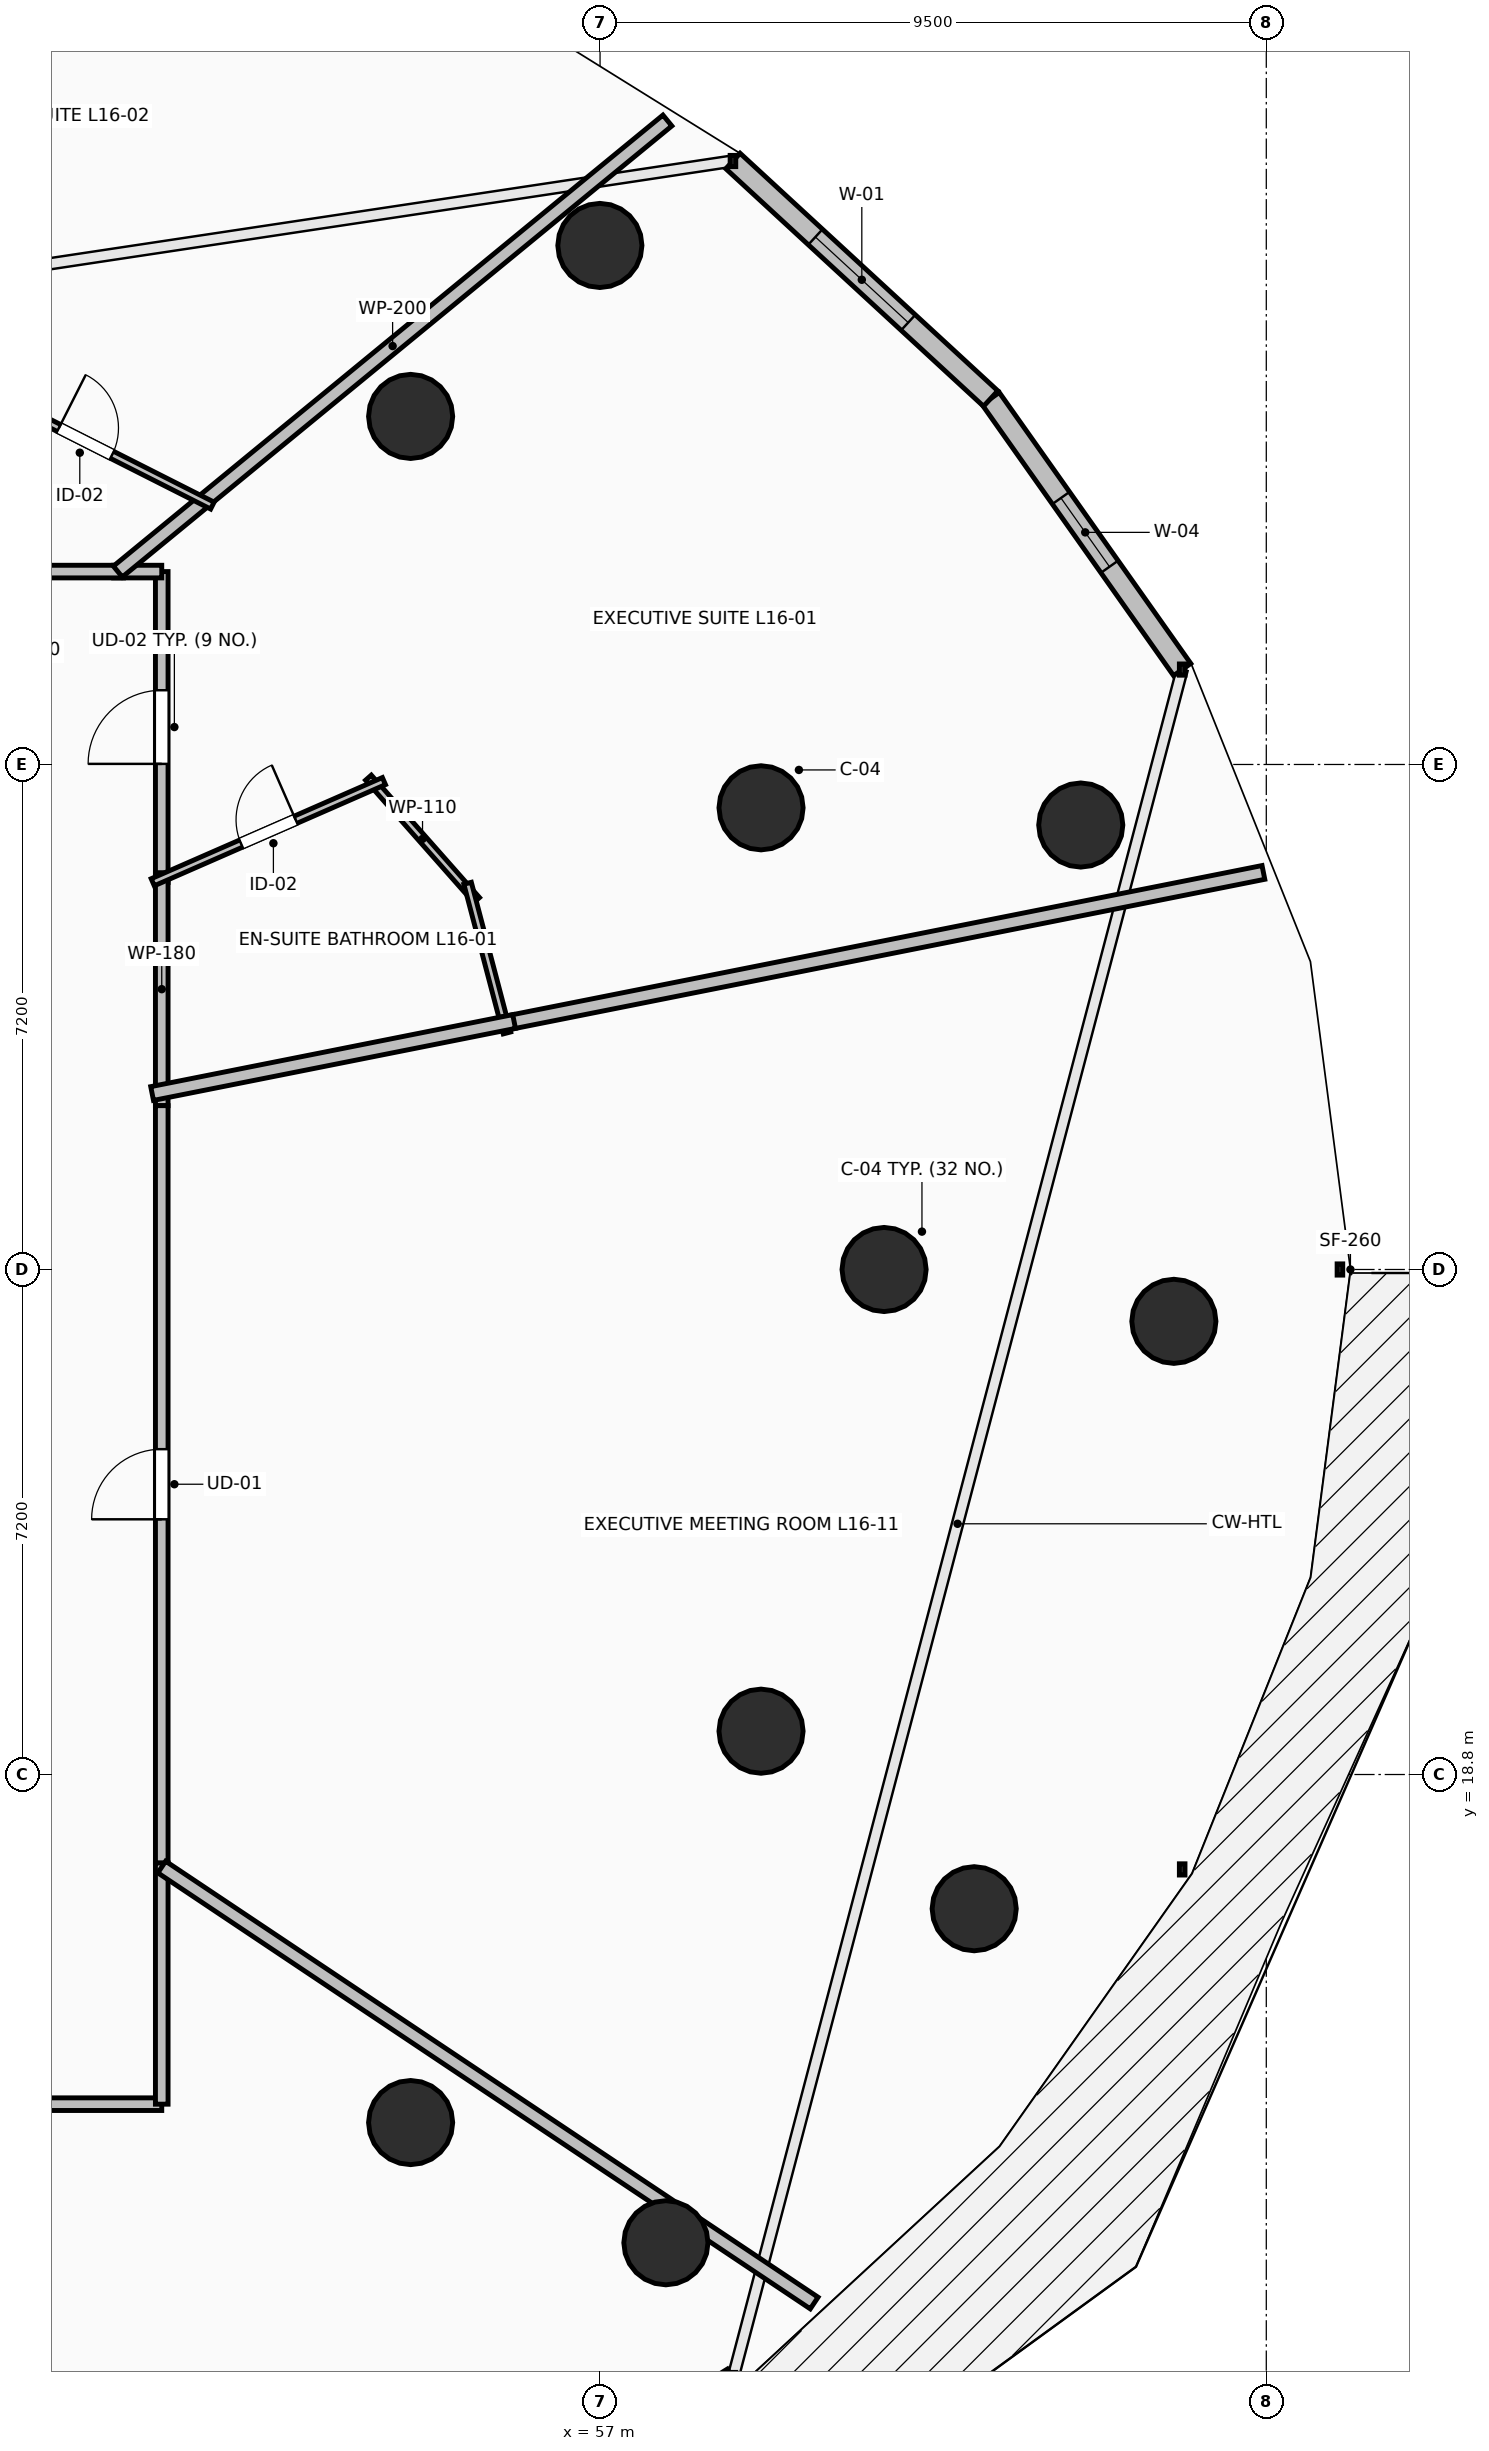
"""IFC4 building model, lengths in metres.
Left out: names, types, materials, properties, quantities, classifications, styles, units other than length and angle.
Written with IfcOpenShell. Run it as: python <this file> out.ifc"""

import sys

from ifc_helpers import new_model, si_unit, direction, frame, frame_2d, origin, origin_2d, place, context, subcontext, project, spatial, rectangle, circle, extrude, element, fill, save


model = new_model("IFC4")
c1 = context("Model", 3, precision=1e-05, world=origin(), true_north=direction((0.0, 1.0)))
c2 = subcontext(c1, "Body", "Model", "MODEL_VIEW")
j1 = project(units=[si_unit("LENGTHUNIT", "METRE"), si_unit("PLANEANGLEUNIT", "RADIAN")], contexts=[c1])
p1 = place(None, origin())
s1 = spatial("IfcSite", under=j1, at=p1, CompositionType="ELEMENT")
p2 = place(p1, origin())
s2 = spatial("IfcBuilding", under=s1, at=p2, CompositionType="ELEMENT")
p3 = place(p2, frame((0.0, 0.0, 62.5)))
s3 = spatial("IfcBuildingStorey", under=s2, at=p3, CompositionType="ELEMENT", Elevation=62.5)
for number, where, z_axis, x_axis in (
    (1, (61.05, 26.0, 0.0), (0.0, 0.0, 1.0), (1.0, 0.0, 0.0)),
    (2, (59.295, 32.582, 0.0), (0.0, 0.0, 1.0), (0.924, 0.383, 0.0)),
    (3, (54.299, 38.162, 0.0), (0.0, 0.0, 1.0), (0.707, 0.707, 0.0)),
    (4, (54.299, 13.838, 0.0), (0.0, 0.0, 1.0), (0.707, -0.707, 0.0)),
    (5, (59.295, 19.418, 0.0), (0.0, 0.0, 1.0), (0.924, -0.383, 0.0)),
    (6, (65.182, 25.261, 0.0), (0.0, 0.0, 1.0), (1.0, 0.0, 0.0)),
    (7, (63.854, 32.337, 0.0), (0.0, 0.0, 1.0), (0.924, 0.383, 0.0)),
    (8, (56.997, 40.6, 0.0), (0.0, 0.0, 1.0), (0.707, 0.707, 0.0)),
    (9, (57.939, 12.124, 0.0), (0.0, 0.0, 1.0), (0.707, -0.707, 0.0)),
    (10, (62.335, 16.886, 0.0), (0.0, 0.0, 1.0), (0.924, -0.383, 0.0)),
):
    element("IfcColumn", number, at=place(p3, frame(where, z_axis=z_axis, x_axis=x_axis)), inside=s3, PredefinedType="COLUMN", context=c2, shape_type="SweptSolid", body=[
        extrude(circle(Radius=0.6, at=origin_2d()), origin(), (0.0, 0.0, 1.0), 3.5),
    ])
p4 = place(p3, frame((65.301, 34.553, 0.0), z_axis=(0.0, 0.0, 1.0), x_axis=(-0.577130815624, 0.816651713803, 0.0)))
e11 = element("IfcWall", 11, at=p4, inside=s3, PredefinedType="STANDARD", context=c2, shape_type="SweptSolid", body=[
    extrude(rectangle(XDim=4.731, YDim=0.3, at=frame_2d((2.366, 0.0))), origin(), (0.0, 0.0, 1.0), 3.24),
])
p5 = place(p4, frame((1.795, 0.0, 0.85)))
e12 = element("IfcOpeningElement", 12, at=p5, cuts=e11, PredefinedType="OPENING", context=c2, shape_type="SweptSolid", body=[
    extrude(rectangle(XDim=1.2, YDim=1.95, at=frame_2d((0.6, 0.975))), frame((0.0, 0.165, 0.0), z_axis=(0.0, -1.0, 0.0), x_axis=(1.0, 0.0, 0.0)), (0.0, 0.0, 1.0), 0.33),
])
p6 = place(p3, frame((62.57, 38.417, 0.0), z_axis=(0.0, 0.0, 1.0), x_axis=(-0.735342629635, 0.677695519419, 0.0)))
e13 = element("IfcWall", 13, at=p6, inside=s3, PredefinedType="STANDARD", context=c2, shape_type="SweptSolid", body=[
    extrude(rectangle(XDim=4.997, YDim=0.3, at=frame_2d((2.499, 0.0))), origin(), (0.0, 0.0, 1.0), 3.24),
])
p7 = place(p6, frame((1.599, 0.0, 0.85)))
e14 = element("IfcOpeningElement", 14, at=p7, cuts=e13, PredefinedType="OPENING", context=c2, shape_type="SweptSolid", body=[
    extrude(rectangle(XDim=1.8, YDim=2.19, at=frame_2d((0.9, 1.095))), frame((0.0, 0.165, 0.0), z_axis=(0.0, -1.0, 0.0), x_axis=(1.0, 0.0, 0.0)), (0.0, 0.0, 1.0), 0.33),
])
p8 = place(p3, frame((54.417, 7.417, 0.0), z_axis=(0.0, 0.0, 1.0), x_axis=(0.849633724826, 0.527373239404, 0.0)))
e15 = element("IfcWall", 15, at=p8, inside=s3, PredefinedType="STANDARD", context=c2, shape_type="SweptSolid", body=[
    extrude(rectangle(XDim=5.271, YDim=0.3, at=frame_2d((2.635, 0.0))), origin(), (0.0, 0.0, 1.0), 3.24),
])
p9 = place(p8, frame((1.735, 0.0, 0.85)))
e16 = element("IfcOpeningElement", 16, at=p9, cuts=e15, PredefinedType="OPENING", context=c2, shape_type="SweptSolid", body=[
    extrude(rectangle(XDim=1.8, YDim=2.19, at=frame_2d((0.9, 1.095))), frame((0.0, 0.165, 0.0), z_axis=(0.0, -1.0, 0.0), x_axis=(1.0, 0.0, 0.0)), (0.0, 0.0, 1.0), 0.33),
])
p10 = place(p3, frame((50.75, 31.517, 0.0), z_axis=(0.0, 0.0, 1.0), x_axis=(0.0, 1.0, 0.0)))
e17 = element("IfcWall", 17, at=p10, inside=s3, PredefinedType="PARTITIONING", context=c2, shape_type="SweptSolid", body=[
    extrude(rectangle(XDim=4.433, YDim=0.18, at=frame_2d((2.216, 0.0))), origin(), (0.0, 0.0, 1.0), 2.432),
])
p11 = place(p10, frame((1.691, 0.0, 0.0)))
e18 = element("IfcOpeningElement", 18, at=p11, cuts=e17, PredefinedType="OPENING", context=c2, shape_type="SweptSolid", body=[
    extrude(rectangle(XDim=1.05, YDim=2.2, at=frame_2d((0.525, 1.1))), frame((0.0, 0.105, 0.0), z_axis=(0.0, -1.0, 0.0), x_axis=(1.0, 0.0, 0.0)), (0.0, 0.0, 1.0), 0.21),
])
p12 = place(p3, frame((50.75, 35.95, 0.0), z_axis=(0.0, 0.0, 1.0), x_axis=(-1.0, 0.0, 0.0)))
e19 = element("IfcWall", 19, at=p12, inside=s3, PredefinedType="PARTITIONING", context=c2, shape_type="SweptSolid", body=[
    extrude(rectangle(XDim=0.686, YDim=0.18, at=frame_2d((0.343, 0.0))), origin(), (0.0, 0.0, 1.0), 3.24),
])
p13 = place(p3, frame((50.75, 28.336, 0.0), z_axis=(0.0, 0.0, 1.0), x_axis=(0.0, 1.0, 0.0)))
e20 = element("IfcWall", 20, at=p13, inside=s3, PredefinedType="PARTITIONING", context=c2, shape_type="SweptSolid", body=[
    extrude(rectangle(XDim=3.321, YDim=0.18, at=frame_2d((1.661, 0.0))), origin(), (0.0, 0.0, 1.0), 3.24),
])
p14 = place(p3, frame((50.204, 35.95, 0.0), z_axis=(0.0, 0.0, 1.0), x_axis=(-1.0, 0.0, 0.0)))
e21 = element("IfcWall", 21, at=p14, inside=s3, PredefinedType="PARTITIONING", context=c2, shape_type="SweptSolid", body=[
    extrude(rectangle(XDim=4.424, YDim=0.18, at=frame_2d((2.212, 0.0))), origin(), (0.0, 0.0, 1.0), 2.432),
])
p15 = place(p3, frame((42.34, 14.1, 0.0), z_axis=(0.0, 0.0, 1.0), x_axis=(1.0, 0.0, 0.0)))
e22 = element("IfcWall", 22, at=p15, inside=s3, PredefinedType="PARTITIONING", context=c2, shape_type="SweptSolid", body=[
    extrude(rectangle(XDim=8.41, YDim=0.18, at=frame_2d((4.205, 0.0))), origin(), (0.0, 0.0, 1.0), 2.432),
])
p16 = place(p15, frame((3.705, 0.0, 0.0)))
e23 = element("IfcOpeningElement", 23, at=p16, cuts=e22, PredefinedType="OPENING", context=c2, shape_type="SweptSolid", body=[
    extrude(rectangle(XDim=1.0, YDim=2.15, at=frame_2d((0.5, 1.075))), frame((0.0, 0.105, 0.0), z_axis=(0.0, -1.0, 0.0), x_axis=(1.0, 0.0, 0.0)), (0.0, 0.0, 1.0), 0.21),
])
p17 = place(p3, frame((50.75, 14.1, 0.0), z_axis=(0.0, 0.0, 1.0), x_axis=(0.0, 1.0, 0.0)))
e24 = element("IfcWall", 24, at=p17, inside=s3, PredefinedType="PARTITIONING", context=c2, shape_type="SweptSolid", body=[
    extrude(rectangle(XDim=3.441, YDim=0.18, at=frame_2d((1.72, 0.0))), origin(), (0.0, 0.0, 1.0), 2.432),
])
p18 = place(p3, frame((50.75, 17.541, 0.0), z_axis=(0.0, 0.0, 1.0), x_axis=(0.0, 1.0, 0.0)))
e25 = element("IfcWall", 25, at=p18, inside=s3, PredefinedType="PARTITIONING", context=c2, shape_type="SweptSolid", body=[
    extrude(rectangle(XDim=10.795, YDim=0.18, at=frame_2d((5.397, 0.0))), origin(), (0.0, 0.0, 1.0), 2.432),
])
p19 = place(p18, frame((4.897, 0.0, 0.0)))
e26 = element("IfcOpeningElement", 26, at=p19, cuts=e25, PredefinedType="OPENING", context=c2, shape_type="SweptSolid", body=[
    extrude(rectangle(XDim=1.0, YDim=2.15, at=frame_2d((0.5, 1.075))), frame((0.0, 0.105, 0.0), z_axis=(0.0, -1.0, 0.0), x_axis=(1.0, 0.0, 0.0)), (0.0, 0.0, 1.0), 0.21),
])
p20 = place(p3, frame((53.697, 33.012, 0.0), z_axis=(0.0, 0.0, 1.0), x_axis=(0.66211021146, -0.749406477074, 0.0)))
e27 = element("IfcWall", 27, at=p20, inside=s3, PredefinedType="PARTITIONING", context=c2, shape_type="SweptSolid", body=[
    extrude(rectangle(XDim=2.33, YDim=0.11, at=frame_2d((1.165, 0.0))), origin(), (0.0, 0.0, 1.0), 2.432),
])
p21 = place(p3, frame((55.111, 31.506, 0.0), z_axis=(0.0, 0.0, 1.0), x_axis=(0.254389812051, -0.967101764823, 0.0)))
e28 = element("IfcWall", 28, at=p21, inside=s3, PredefinedType="PARTITIONING", context=c2, shape_type="SweptSolid", body=[
    extrude(rectangle(XDim=2.206, YDim=0.11, at=frame_2d((1.103, 0.0))), origin(), (0.0, 0.0, 1.0), 3.24),
])
p22 = place(p3, frame((50.622, 31.521, 0.0), z_axis=(0.0, 0.0, 1.0), x_axis=(0.91617134915, 0.400786799928, 0.0)))
e29 = element("IfcWall", 29, at=p22, inside=s3, PredefinedType="PARTITIONING", context=c2, shape_type="SweptSolid", body=[
    extrude(rectangle(XDim=3.598, YDim=0.11, at=frame_2d((1.799, 0.0))), origin(), (0.0, 0.0, 1.0), 2.432),
])
p23 = place(p22, frame((1.374, 0.0, 0.0)))
e30 = element("IfcOpeningElement", 30, at=p23, cuts=e29, PredefinedType="OPENING", context=c2, shape_type="SweptSolid", body=[
    extrude(rectangle(XDim=0.85, YDim=2.1, at=frame_2d((0.425, 1.05))), frame((0.0, 0.07, 0.0), z_axis=(0.0, -1.0, 0.0), x_axis=(1.0, 0.0, 0.0)), (0.0, 0.0, 1.0), 0.14),
])
p24 = place(p3, frame((57.96, 42.381, 0.0), z_axis=(0.0, 0.0, 1.0), x_axis=(-0.772992813725, -0.634414777515, 0.0)))
e31 = element("IfcWall", 31, at=p24, inside=s3, PredefinedType="PARTITIONING", context=c2, shape_type="SweptSolid", body=[
    extrude(rectangle(XDim=10.137, YDim=0.2, at=frame_2d((5.069, 0.0))), origin(), (0.0, 0.0, 1.0), 2.624),
])
p25 = place(p3, frame((55.637, 29.508, 0.0), z_axis=(0.0, 0.0, 1.0), x_axis=(0.980781844691, 0.195107593712, 0.0)))
e32 = element("IfcWall", 32, at=p25, inside=s3, PredefinedType="PARTITIONING", context=c2, shape_type="SweptSolid", body=[
    extrude(rectangle(XDim=11.034, YDim=0.2, at=frame_2d((5.517, 0.0))), origin(), (0.0, 0.0, 1.0), 2.624),
])
p26 = place(p3, frame((50.613, 28.509, 0.0), z_axis=(0.0, 0.0, 1.0), x_axis=(0.980788877604, 0.195072236795, 0.0)))
e33 = element("IfcWall", 33, at=p26, inside=s3, PredefinedType="PARTITIONING", context=c2, shape_type="SweptSolid", body=[
    extrude(rectangle(XDim=5.263, YDim=0.2, at=frame_2d((2.631, 0.0))), origin(), (0.0, 0.0, 1.0), 2.874),
])
p27 = place(p3, frame((47.853, 38.72, 0.0), z_axis=(0.0, 0.0, 1.0), x_axis=(0.892455812043, -0.451134817489, 0.0)))
e34 = element("IfcWall", 34, at=p27, inside=s3, PredefinedType="PARTITIONING", context=c2, shape_type="SweptSolid", body=[
    extrude(rectangle(XDim=4.055, YDim=0.11, at=frame_2d((2.027, 0.0))), origin(), (0.0, 0.0, 1.0), 3.24),
])
p28 = place(p27, frame((1.603, 0.0, 0.0)))
e35 = element("IfcOpeningElement", 35, at=p28, cuts=e34, PredefinedType="OPENING", context=c2, shape_type="SweptSolid", body=[
    extrude(rectangle(XDim=0.85, YDim=2.1, at=frame_2d((0.425, 1.05))), frame((0.0, 0.07, 0.0), z_axis=(0.0, -1.0, 0.0), x_axis=(1.0, 0.0, 0.0)), (0.0, 0.0, 1.0), 0.14),
])
p29 = place(p3, frame((60.053, 11.265, 0.0), z_axis=(0.0, 0.0, 1.0), x_axis=(-0.831469078055, 0.555571032577, 0.0)))
e36 = element("IfcWall", 36, at=p29, inside=s3, PredefinedType="PARTITIONING", context=c2, shape_type="SweptSolid", body=[
    extrude(rectangle(XDim=11.189, YDim=0.2, at=frame_2d((5.594, 0.0))), origin(), (0.0, 0.0, 1.0), 2.624),
])
p30 = place(p5, origin())
e37 = element("IfcWindow", 37, at=p30, inside=s3, PartitioningType="SINGLE_PANEL", PredefinedType="WINDOW", context=c2, shape_type="SweptSolid", body=[
    extrude(rectangle(XDim=1.2, YDim=1.95, at=frame_2d((0.6, 0.975))), frame((0.0, 0.03, 0.0), z_axis=(0.0, -1.0, 0.0), x_axis=(1.0, 0.0, 0.0)), (0.0, 0.0, 1.0), 0.06),
])
fill(e12, e37)
p31 = place(p7, origin())
e38 = element("IfcWindow", 38, at=p31, inside=s3, PartitioningType="SINGLE_PANEL", PredefinedType="WINDOW", context=c2, shape_type="SweptSolid", body=[
    extrude(rectangle(XDim=1.8, YDim=2.19, at=frame_2d((0.9, 1.095))), frame((0.0, 0.03, 0.0), z_axis=(0.0, -1.0, 0.0), x_axis=(1.0, 0.0, 0.0)), (0.0, 0.0, 1.0), 0.06),
])
fill(e14, e38)
p32 = place(p11, origin())
e39 = element("IfcDoor", 39, at=p32, inside=s3, OperationType="SINGLE_SWING_LEFT", PredefinedType="DOOR", context=c2, shape_type="SweptSolid", body=[
    extrude(rectangle(XDim=1.05, YDim=2.2, at=frame_2d((0.525, 1.1))), frame((0.0, 0.025, 0.0), z_axis=(0.0, -1.0, 0.0), x_axis=(1.0, 0.0, 0.0)), (0.0, 0.0, 1.0), 0.05),
])
fill(e18, e39)
p33 = place(p19, origin())
e40 = element("IfcDoor", 40, at=p33, inside=s3, OperationType="SINGLE_SWING_LEFT", PredefinedType="DOOR", context=c2, shape_type="SweptSolid", body=[
    extrude(rectangle(XDim=1.0, YDim=2.15, at=frame_2d((0.5, 1.075))), frame((0.0, 0.025, 0.0), z_axis=(0.0, -1.0, 0.0), x_axis=(1.0, 0.0, 0.0)), (0.0, 0.0, 1.0), 0.05),
])
fill(e26, e40)
p34 = place(p23, origin())
e41 = element("IfcDoor", 41, at=p34, inside=s3, OperationType="SINGLE_SWING_RIGHT", PredefinedType="DOOR", context=c2, shape_type="SweptSolid", body=[
    extrude(rectangle(XDim=0.85, YDim=2.1, at=frame_2d((0.425, 1.05))), frame((0.0, 0.025, 0.0), z_axis=(0.0, -1.0, 0.0), x_axis=(1.0, 0.0, 0.0)), (0.0, 0.0, 1.0), 0.05),
])
fill(e30, e41)
p35 = place(p28, origin())
e42 = element("IfcDoor", 42, at=p35, inside=s3, OperationType="SINGLE_SWING_LEFT", PredefinedType="DOOR", context=c2, shape_type="SweptSolid", body=[
    extrude(rectangle(XDim=0.85, YDim=2.1, at=frame_2d((0.425, 1.05))), frame((0.0, 0.025, 0.0), z_axis=(0.0, -1.0, 0.0), x_axis=(1.0, 0.0, 0.0)), (0.0, 0.0, 1.0), 0.05),
])
fill(e35, e42)
save(model, sys.argv[1])
